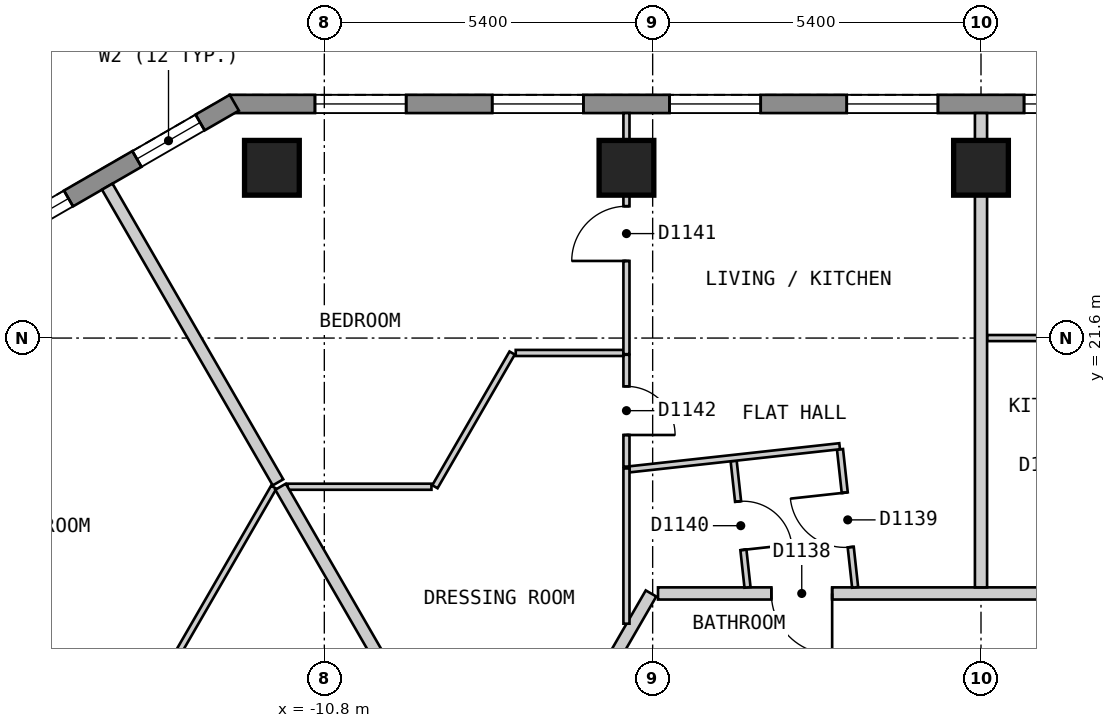
"""IFC4 building model, lengths in metres.
Left out: names, types, materials, properties, quantities, classifications, styles, units other than length and angle.
Written with IfcOpenShell. Run it as: python <this file> out.ifc"""

import sys

from ifc_helpers import new_model, si_unit, direction, frame, frame_2d, origin, origin_2d, place, context, subcontext, project, spatial, polyline, rectangle, outline, extrude, element, fill, save


model = new_model("IFC4")
c1 = context("Model", 3, precision=1e-05, world=origin(), true_north=direction((0.0, 1.0)))
c2 = subcontext(c1, "Body", "Model", "MODEL_VIEW")
j1 = project(units=[si_unit("LENGTHUNIT", "METRE"), si_unit("PLANEANGLEUNIT", "RADIAN")], contexts=[c1])
p1 = place(None, origin())
s1 = spatial("IfcSite", under=j1, at=p1, CompositionType="ELEMENT")
p2 = place(p1, origin())
s2 = spatial("IfcBuilding", under=s1, at=p2, CompositionType="ELEMENT")
p3 = place(p2, frame((0.0, 0.0, 144.6)))
s3 = spatial("IfcBuildingStorey", under=s2, at=p3, CompositionType="ELEMENT", Elevation=144.6)
for number, where, z_axis, x_axis in (
    (1, (0.0, 24.4, 0.0), (0.0, 0.0, 1.0), (-1.0, 0.0, 0.0)),
    (2, (-5.831, 24.4, 0.0), (0.0, 0.0, 1.0), (-1.0, 0.0, 0.0)),
    (3, (-11.662, 24.4, 0.0), (0.0, 0.0, 1.0), (-1.0, 0.0, 0.0)),
):
    element("IfcColumn", number, at=place(p3, frame(where, z_axis=z_axis, x_axis=x_axis)), inside=s3, PredefinedType="COLUMN", context=c2, shape_type="SweptSolid", body=[
        extrude(rectangle(XDim=0.9, YDim=0.9, at=origin_2d()), origin(), (0.0, 0.0, 1.0), 3.0),
    ])
p4 = place(p3, frame((12.355, 25.45, 0.0), z_axis=(0.0, 0.0, 1.0), x_axis=(-1.0, 0.0, 0.0)))
e4 = element("IfcWall", 4, at=p4, inside=s3, PredefinedType="SOLIDWALL", context=c2, shape_type="SweptSolid", body=[
    extrude(outline(polyline([(0.0, -0.15), (24.71, -0.15), (24.63, 0.15), (0.08, 0.15), (0.0, -0.15)])), origin(), (0.0, 0.0, 1.0), 2.7),
])
p5 = place(p4, frame((1.401, 0.0, 0.15)))
e5 = element("IfcOpeningElement", 5, at=p5, cuts=e4, PredefinedType="OPENING", context=c2, shape_type="SweptSolid", body=[
    extrude(rectangle(XDim=1.5, YDim=2.1, at=frame_2d((0.75, 1.05))), frame((0.0, 0.16, 0.0), z_axis=(0.0, -1.0, 0.0), x_axis=(1.0, 0.0, 0.0)), (0.0, 0.0, 1.0), 0.32),
])
p6 = place(p4, frame((4.316, 0.0, 0.15)))
e6 = element("IfcOpeningElement", 6, at=p6, cuts=e4, PredefinedType="OPENING", context=c2, shape_type="SweptSolid", body=[
    extrude(rectangle(XDim=1.5, YDim=2.1, at=frame_2d((0.75, 1.05))), frame((0.0, 0.16, 0.0), z_axis=(0.0, -1.0, 0.0), x_axis=(1.0, 0.0, 0.0)), (0.0, 0.0, 1.0), 0.32),
])
p7 = place(p4, frame((7.232, 0.0, 0.15)))
e7 = element("IfcOpeningElement", 7, at=p7, cuts=e4, PredefinedType="OPENING", context=c2, shape_type="SweptSolid", body=[
    extrude(rectangle(XDim=1.5, YDim=2.1, at=frame_2d((0.75, 1.05))), frame((0.0, 0.16, 0.0), z_axis=(0.0, -1.0, 0.0), x_axis=(1.0, 0.0, 0.0)), (0.0, 0.0, 1.0), 0.32),
])
p8 = place(p4, frame((10.147, 0.0, 0.15)))
e8 = element("IfcOpeningElement", 8, at=p8, cuts=e4, PredefinedType="OPENING", context=c2, shape_type="SweptSolid", body=[
    extrude(rectangle(XDim=1.5, YDim=2.1, at=frame_2d((0.75, 1.05))), frame((0.0, 0.16, 0.0), z_axis=(0.0, -1.0, 0.0), x_axis=(1.0, 0.0, 0.0)), (0.0, 0.0, 1.0), 0.32),
])
p9 = place(p4, frame((13.063, 0.0, 0.15)))
e9 = element("IfcOpeningElement", 9, at=p9, cuts=e4, PredefinedType="OPENING", context=c2, shape_type="SweptSolid", body=[
    extrude(rectangle(XDim=1.5, YDim=2.1, at=frame_2d((0.75, 1.05))), frame((0.0, 0.16, 0.0), z_axis=(0.0, -1.0, 0.0), x_axis=(1.0, 0.0, 0.0)), (0.0, 0.0, 1.0), 0.32),
])
p10 = place(p4, frame((15.978, 0.0, 0.15)))
e10 = element("IfcOpeningElement", 10, at=p10, cuts=e4, PredefinedType="OPENING", context=c2, shape_type="SweptSolid", body=[
    extrude(rectangle(XDim=1.5, YDim=2.1, at=frame_2d((0.75, 1.05))), frame((0.0, 0.16, 0.0), z_axis=(0.0, -1.0, 0.0), x_axis=(1.0, 0.0, 0.0)), (0.0, 0.0, 1.0), 0.32),
])
p11 = place(p4, frame((18.894, 0.0, 0.15)))
e11 = element("IfcOpeningElement", 11, at=p11, cuts=e4, PredefinedType="OPENING", context=c2, shape_type="SweptSolid", body=[
    extrude(rectangle(XDim=1.5, YDim=2.1, at=frame_2d((0.75, 1.05))), frame((0.0, 0.16, 0.0), z_axis=(0.0, -1.0, 0.0), x_axis=(1.0, 0.0, 0.0)), (0.0, 0.0, 1.0), 0.32),
])
p12 = place(p4, frame((21.809, 0.0, 0.15)))
e12 = element("IfcOpeningElement", 12, at=p12, cuts=e4, PredefinedType="OPENING", context=c2, shape_type="SweptSolid", body=[
    extrude(rectangle(XDim=1.5, YDim=2.1, at=frame_2d((0.75, 1.05))), frame((0.0, 0.16, 0.0), z_axis=(0.0, -1.0, 0.0), x_axis=(1.0, 0.0, 0.0)), (0.0, 0.0, 1.0), 0.32),
])
p13 = place(p3, frame((-12.28, 25.47, 0.0), z_axis=(0.0, 0.0, 1.0), x_axis=(-0.866022959057, -0.500004234368, 0.0)))
e13 = element("IfcWall", 13, at=p13, inside=s3, PredefinedType="SOLIDWALL", context=c2, shape_type="SweptSolid", body=[
    extrude(outline(polyline([(0.0, -0.15), (5.0, -0.15), (4.92, 0.15), (0.08, 0.15), (0.0, -0.15)])), origin(), (0.0, 0.0, 1.0), 2.7),
])
p14 = place(p13, frame((0.65, 0.0, 0.15)))
e14 = element("IfcOpeningElement", 14, at=p14, cuts=e13, PredefinedType="OPENING", context=c2, shape_type="SweptSolid", body=[
    extrude(rectangle(XDim=1.2, YDim=2.1, at=frame_2d((0.6, 1.05))), frame((0.0, 0.16, 0.0), z_axis=(0.0, -1.0, 0.0), x_axis=(1.0, 0.0, 0.0)), (0.0, 0.0, 1.0), 0.32),
])
p15 = place(p13, frame((3.149, 0.0, 0.15)))
e15 = element("IfcOpeningElement", 15, at=p15, cuts=e13, PredefinedType="OPENING", context=c2, shape_type="SweptSolid", body=[
    extrude(rectangle(XDim=1.2, YDim=2.1, at=frame_2d((0.6, 1.05))), frame((0.0, 0.16, 0.0), z_axis=(0.0, -1.0, 0.0), x_axis=(1.0, 0.0, 0.0)), (0.0, 0.0, 1.0), 0.32),
])
p16 = place(p3, frame((-5.312, 17.4, 0.0), z_axis=(0.0, 0.0, 1.0), x_axis=(1.0, 0.0, 0.0)))
e16 = element("IfcWall", 16, at=p16, inside=s3, PredefinedType="PARTITIONING", context=c2, shape_type="SweptSolid", body=[
    extrude(rectangle(XDim=10.739, YDim=0.2, at=frame_2d((5.37, 0.0))), origin(), (0.0, 0.0, 1.0), 2.7),
])
p17 = place(p16, frame((7.538, 0.0, 0.0)))
e17 = element("IfcOpeningElement", 17, at=p17, cuts=e16, PredefinedType="OPENING", context=c2, shape_type="SweptSolid", body=[
    extrude(rectangle(XDim=1.0, YDim=2.1, at=frame_2d((0.5, 1.05))), frame((0.0, 0.11, 0.0), z_axis=(0.0, -1.0, 0.0), x_axis=(1.0, 0.0, 0.0)), (0.0, 0.0, 1.0), 0.22),
])
p18 = place(p16, frame((1.864, 0.0, 0.0)))
e18 = element("IfcOpeningElement", 18, at=p18, cuts=e16, PredefinedType="OPENING", context=c2, shape_type="SweptSolid", body=[
    extrude(rectangle(XDim=1.0, YDim=2.1, at=frame_2d((0.5, 1.05))), frame((0.0, 0.11, 0.0), z_axis=(0.0, -1.0, 0.0), x_axis=(1.0, 0.0, 0.0)), (0.0, 0.0, 1.0), 0.22),
])
p19 = place(p3, frame((-6.697, 15.2, 0.0), z_axis=(0.0, 0.0, 1.0), x_axis=(0.499963722229, 0.866046347752, 0.0)))
e19 = element("IfcWall", 19, at=p19, inside=s3, PredefinedType="PARTITIONING", context=c2, shape_type="SweptSolid", body=[
    extrude(rectangle(XDim=2.54, YDim=0.2, at=frame_2d((1.27, 0.0))), origin(), (0.0, 0.0, 1.0), 2.7),
])
p20 = place(p3, frame((-2.319, 19.77, 0.0), z_axis=(0.0, 0.0, 1.0), x_axis=(0.109046821538, -0.994036614372, 0.0)))
e20 = element("IfcWall", 20, at=p20, inside=s3, PredefinedType="PARTITIONING", context=c2, shape_type="SweptSolid", body=[
    extrude(rectangle(XDim=2.284, YDim=0.1, at=frame_2d((1.142, 0.0))), origin(), (0.0, 0.0, 1.0), 2.7),
])
p21 = place(p20, frame((0.717, 0.0, 0.0)))
e21 = element("IfcOpeningElement", 21, at=p21, cuts=e20, PredefinedType="OPENING", context=c2, shape_type="SweptSolid", body=[
    extrude(rectangle(XDim=0.9, YDim=2.1, at=frame_2d((0.45, 1.05))), frame((0.0, 0.06, 0.0), z_axis=(0.0, -1.0, 0.0), x_axis=(1.0, 0.0, 0.0)), (0.0, 0.0, 1.0), 0.12),
])
p22 = place(p3, frame((-4.068, 19.579, 0.0), z_axis=(0.0, 0.0, 1.0), x_axis=(0.109022161139, -0.994039319333, 0.0)))
e22 = element("IfcWall", 22, at=p22, inside=s3, PredefinedType="PARTITIONING", context=c2, shape_type="SweptSolid", body=[
    extrude(rectangle(XDim=2.092, YDim=0.1, at=frame_2d((1.046, 0.0))), origin(), (0.0, 0.0, 1.0), 2.7),
])
p23 = place(p22, frame((0.671, 0.0, 0.0)))
e23 = element("IfcOpeningElement", 23, at=p23, cuts=e22, PredefinedType="OPENING", context=c2, shape_type="SweptSolid", body=[
    extrude(rectangle(XDim=0.8, YDim=2.1, at=frame_2d((0.4, 1.05))), frame((0.0, 0.06, 0.0), z_axis=(0.0, -1.0, 0.0), x_axis=(1.0, 0.0, 0.0)), (0.0, 0.0, 1.0), 0.12),
])
p24 = place(p3, frame((-5.831, 21.325, 0.0), z_axis=(0.0, 0.0, 1.0), x_axis=(0.0, -1.0, 0.0)))
e24 = element("IfcWall", 24, at=p24, inside=s3, PredefinedType="PARTITIONING", context=c2, shape_type="SweptSolid", body=[
    extrude(rectangle(XDim=1.839, YDim=0.1, at=frame_2d((0.919, 0.0))), origin(), (0.0, 0.0, 1.0), 2.7),
])
p25 = place(p24, frame((0.519, 0.0, 0.0)))
e25 = element("IfcOpeningElement", 25, at=p25, cuts=e24, PredefinedType="OPENING", context=c2, shape_type="SweptSolid", body=[
    extrude(rectangle(XDim=0.8, YDim=2.1, at=frame_2d((0.4, 1.05))), frame((0.0, 0.06, 0.0), z_axis=(0.0, -1.0, 0.0), x_axis=(1.0, 0.0, 0.0)), (0.0, 0.0, 1.0), 0.12),
])
p26 = place(p3, frame((-19.514, 17.599, 0.0), z_axis=(0.0, 0.0, 1.0), x_axis=(0.866007554612, -0.500030914399, 0.0)))
e26 = element("IfcWall", 26, at=p26, inside=s3, PredefinedType="PARTITIONING", context=c2, shape_type="SweptSolid", body=[
    extrude(rectangle(XDim=6.052, YDim=0.1, at=frame_2d((3.026, 0.0))), origin(), (0.0, 0.0, 1.0), 2.7),
])
p27 = place(p26, frame((2.576, 0.0, 0.0)))
e27 = element("IfcOpeningElement", 27, at=p27, cuts=e26, PredefinedType="OPENING", context=c2, shape_type="SweptSolid", body=[
    extrude(rectangle(XDim=0.9, YDim=2.1, at=frame_2d((0.45, 1.05))), frame((0.0, 0.06, 0.0), z_axis=(0.0, -1.0, 0.0), x_axis=(1.0, 0.0, 0.0)), (0.0, 0.0, 1.0), 0.12),
])
p28 = place(p3, frame((-11.405, 19.155, 0.0), z_axis=(0.0, 0.0, 1.0), x_axis=(1.0, 0.0, 0.0)))
e28 = element("IfcWall", 28, at=p28, inside=s3, PredefinedType="PARTITIONING", context=c2, shape_type="SweptSolid", body=[
    extrude(rectangle(XDim=2.367, YDim=0.1, at=frame_2d((1.184, 0.0))), origin(), (0.0, 0.0, 1.0), 2.7),
])
p29 = place(p3, frame((-7.652, 21.355, 0.0), z_axis=(0.0, 0.0, 1.0), x_axis=(1.0, 0.0, 0.0)))
e29 = element("IfcWall", 29, at=p29, inside=s3, PredefinedType="PARTITIONING", context=c2, shape_type="SweptSolid", body=[
    extrude(rectangle(XDim=1.771, YDim=0.1, at=frame_2d((0.885, 0.0))), origin(), (0.0, 0.0, 1.0), 2.7),
])
p30 = place(p3, frame((0.1, 21.6, 0.0), z_axis=(0.0, 0.0, 1.0), x_axis=(1.0, 0.0, 0.0)))
e30 = element("IfcWall", 30, at=p30, inside=s3, PredefinedType="PARTITIONING", context=c2, shape_type="SweptSolid", body=[
    extrude(rectangle(XDim=7.752, YDim=0.1, at=frame_2d((3.876, 0.0))), origin(), (0.0, 0.0, 1.0), 2.7),
])
p31 = place(p30, frame((2.634, 0.0, 0.0)))
e31 = element("IfcOpeningElement", 31, at=p31, cuts=e30, PredefinedType="OPENING", context=c2, shape_type="SweptSolid", body=[
    extrude(rectangle(XDim=0.9, YDim=2.1, at=frame_2d((0.45, 1.05))), frame((0.0, 0.06, 0.0), z_axis=(0.0, -1.0, 0.0), x_axis=(1.0, 0.0, 0.0)), (0.0, 0.0, 1.0), 0.12),
])
p32 = place(p3, frame((-8.981, 19.155, 0.0), z_axis=(0.0, 0.0, 1.0), x_axis=(0.500130227609, 0.865950203783, 0.0)))
e32 = element("IfcWall", 32, at=p32, inside=s3, PredefinedType="PARTITIONING", context=c2, shape_type="SweptSolid", body=[
    extrude(rectangle(XDim=2.539, YDim=0.1, at=frame_2d((1.27, 0.0))), origin(), (0.0, 0.0, 1.0), 2.7),
])
p33 = place(p3, frame((-22.398, 0.499, 0.0), z_axis=(0.0, 0.0, 1.0), x_axis=(0.499981561717, 0.866036048871, 0.0)))
e33 = element("IfcWall", 33, at=p33, inside=s3, PredefinedType="PARTITIONING", context=c2, shape_type="SweptSolid", body=[
    extrude(rectangle(XDim=21.532, YDim=0.1, at=frame_2d((10.766, 0.0))), origin(), (0.0, 0.0, 1.0), 2.7),
])
p34 = place(p33, frame((13.049, 0.0, 0.0)))
e34 = element("IfcOpeningElement", 34, at=p34, cuts=e33, PredefinedType="OPENING", context=c2, shape_type="SweptSolid", body=[
    extrude(rectangle(XDim=0.9, YDim=2.1, at=frame_2d((0.45, 1.05))), frame((0.0, 0.06, 0.0), z_axis=(0.0, -1.0, 0.0), x_axis=(1.0, 0.0, 0.0)), (0.0, 0.0, 1.0), 0.12),
])
p35 = place(p33, frame((2.183, 0.0, 0.0)))
e35 = element("IfcOpeningElement", 35, at=p35, cuts=e33, PredefinedType="OPENING", context=c2, shape_type="SweptSolid", body=[
    extrude(rectangle(XDim=0.8, YDim=2.1, at=frame_2d((0.4, 1.05))), frame((0.0, 0.06, 0.0), z_axis=(0.0, -1.0, 0.0), x_axis=(1.0, 0.0, 0.0)), (0.0, 0.0, 1.0), 0.12),
])
p36 = place(p3, frame((-5.781, 19.441, 0.0), z_axis=(0.0, 0.0, 1.0), x_axis=(0.994005576935, 0.109329378588, 0.0)))
e36 = element("IfcWall", 36, at=p36, inside=s3, PredefinedType="PARTITIONING", context=c2, shape_type="SweptSolid", body=[
    extrude(rectangle(XDim=3.477, YDim=0.1, at=frame_2d((1.738, 0.0))), origin(), (0.0, 0.0, 1.0), 2.7),
])
p37 = place(p3, frame((-5.831, 16.903, 0.0), z_axis=(0.0, 0.0, 1.0), x_axis=(0.0, 1.0, 0.0)))
e37 = element("IfcWall", 37, at=p37, inside=s3, PredefinedType="PARTITIONING", context=c2, shape_type="SweptSolid", body=[
    extrude(rectangle(XDim=2.553, YDim=0.1, at=frame_2d((1.276, 0.0))), origin(), (0.0, 0.0, 1.0), 2.7),
])
p38 = place(p3, frame((-5.831, 21.335, 0.0), z_axis=(0.0, 0.0, 1.0), x_axis=(0.0, 1.0, 0.0)))
e38 = element("IfcWall", 38, at=p38, inside=s3, PredefinedType="PARTITIONING", context=c2, shape_type="SweptSolid", body=[
    extrude(rectangle(XDim=3.965, YDim=0.1, at=frame_2d((1.982, 0.0))), origin(), (0.0, 0.0, 1.0), 2.7),
])
p39 = place(p38, frame((1.533, 0.0, 0.0)))
e39 = element("IfcOpeningElement", 39, at=p39, cuts=e38, PredefinedType="OPENING", context=c2, shape_type="SweptSolid", body=[
    extrude(rectangle(XDim=0.9, YDim=2.1, at=frame_2d((0.45, 1.05))), frame((0.0, 0.06, 0.0), z_axis=(0.0, -1.0, 0.0), x_axis=(1.0, 0.0, 0.0)), (0.0, 0.0, 1.0), 0.12),
])
p40 = place(p3, frame((-14.37, 24.09, 0.0), z_axis=(0.0, 0.0, 1.0), x_axis=(0.500057386422, -0.865992269183, 0.0)))
e40 = element("IfcWall", 40, at=p40, inside=s3, PredefinedType="PARTITIONING", context=c2, shape_type="SweptSolid", body=[
    extrude(rectangle(XDim=5.615, YDim=0.2, at=frame_2d((2.808, 0.0))), origin(), (0.0, 0.0, 1.0), 2.7),
])
p41 = place(p3, frame((-11.52, 19.155, 0.0), z_axis=(0.0, 0.0, 1.0), x_axis=(0.499916824138, -0.866073420066, 0.0)))
e41 = element("IfcWall", 41, at=p41, inside=s3, PredefinedType="PARTITIONING", context=c2, shape_type="SweptSolid", body=[
    extrude(rectangle(XDim=4.567, YDim=0.2, at=frame_2d((2.283, 0.0))), origin(), (0.0, 0.0, 1.0), 2.7),
])
p42 = place(p3, frame((0.0, 17.5, 0.0), z_axis=(0.0, 0.0, 1.0), x_axis=(0.0, 1.0, 0.0)))
e42 = element("IfcWall", 42, at=p42, inside=s3, PredefinedType="PARTITIONING", context=c2, shape_type="SweptSolid", body=[
    extrude(rectangle(XDim=7.8, YDim=0.2, at=frame_2d((3.9, 0.0))), origin(), (0.0, 0.0, 1.0), 2.7),
])
p43 = place(p8, origin())
e43 = element("IfcWindow", 43, at=p43, inside=s3, PartitioningType="SINGLE_PANEL", PredefinedType="WINDOW", context=c2, shape_type="SweptSolid", body=[
    extrude(rectangle(XDim=1.5, YDim=2.1, at=frame_2d((0.75, 1.05))), frame((0.0, 0.03, 0.0), z_axis=(0.0, -1.0, 0.0), x_axis=(1.0, 0.0, 0.0)), (0.0, 0.0, 1.0), 0.06),
])
fill(e8, e43)
p44 = place(p9, origin())
e44 = element("IfcWindow", 44, at=p44, inside=s3, PartitioningType="SINGLE_PANEL", PredefinedType="WINDOW", context=c2, shape_type="SweptSolid", body=[
    extrude(rectangle(XDim=1.5, YDim=2.1, at=frame_2d((0.75, 1.05))), frame((0.0, 0.03, 0.0), z_axis=(0.0, -1.0, 0.0), x_axis=(1.0, 0.0, 0.0)), (0.0, 0.0, 1.0), 0.06),
])
fill(e9, e44)
p45 = place(p10, origin())
e45 = element("IfcWindow", 45, at=p45, inside=s3, PartitioningType="SINGLE_PANEL", PredefinedType="WINDOW", context=c2, shape_type="SweptSolid", body=[
    extrude(rectangle(XDim=1.5, YDim=2.1, at=frame_2d((0.75, 1.05))), frame((0.0, 0.03, 0.0), z_axis=(0.0, -1.0, 0.0), x_axis=(1.0, 0.0, 0.0)), (0.0, 0.0, 1.0), 0.06),
])
fill(e10, e45)
p46 = place(p11, origin())
e46 = element("IfcWindow", 46, at=p46, inside=s3, PartitioningType="SINGLE_PANEL", PredefinedType="WINDOW", context=c2, shape_type="SweptSolid", body=[
    extrude(rectangle(XDim=1.5, YDim=2.1, at=frame_2d((0.75, 1.05))), frame((0.0, 0.03, 0.0), z_axis=(0.0, -1.0, 0.0), x_axis=(1.0, 0.0, 0.0)), (0.0, 0.0, 1.0), 0.06),
])
fill(e11, e46)
p47 = place(p12, origin())
e47 = element("IfcWindow", 47, at=p47, inside=s3, PartitioningType="SINGLE_PANEL", PredefinedType="WINDOW", context=c2, shape_type="SweptSolid", body=[
    extrude(rectangle(XDim=1.5, YDim=2.1, at=frame_2d((0.75, 1.05))), frame((0.0, 0.03, 0.0), z_axis=(0.0, -1.0, 0.0), x_axis=(1.0, 0.0, 0.0)), (0.0, 0.0, 1.0), 0.06),
])
fill(e12, e47)
p48 = place(p14, origin())
e48 = element("IfcWindow", 48, at=p48, inside=s3, PartitioningType="SINGLE_PANEL", PredefinedType="WINDOW", context=c2, shape_type="SweptSolid", body=[
    extrude(rectangle(XDim=1.2, YDim=2.1, at=frame_2d((0.6, 1.05))), frame((0.0, 0.03, 0.0), z_axis=(0.0, -1.0, 0.0), x_axis=(1.0, 0.0, 0.0)), (0.0, 0.0, 1.0), 0.06),
])
fill(e14, e48)
p49 = place(p15, origin())
e49 = element("IfcWindow", 49, at=p49, inside=s3, PartitioningType="SINGLE_PANEL", PredefinedType="WINDOW", context=c2, shape_type="SweptSolid", body=[
    extrude(rectangle(XDim=1.2, YDim=2.1, at=frame_2d((0.6, 1.05))), frame((0.0, 0.03, 0.0), z_axis=(0.0, -1.0, 0.0), x_axis=(1.0, 0.0, 0.0)), (0.0, 0.0, 1.0), 0.06),
])
fill(e15, e49)
p50 = place(p18, origin())
e50 = element("IfcDoor", 50, at=p50, inside=s3, OperationType="SINGLE_SWING_RIGHT", PredefinedType="DOOR", context=c2, shape_type="SweptSolid", body=[
    extrude(rectangle(XDim=1.0, YDim=2.1, at=frame_2d((0.5, 1.05))), frame((0.0, 0.025, 0.0), z_axis=(0.0, -1.0, 0.0), x_axis=(1.0, 0.0, 0.0)), (0.0, 0.0, 1.0), 0.05),
])
fill(e18, e50)
p51 = place(p21, origin())
e51 = element("IfcDoor", 51, at=p51, inside=s3, OperationType="SINGLE_SWING_LEFT", PredefinedType="DOOR", context=c2, shape_type="SweptSolid", body=[
    extrude(rectangle(XDim=0.9, YDim=2.1, at=frame_2d((0.45, 1.05))), frame((0.0, 0.025, 0.0), z_axis=(0.0, -1.0, 0.0), x_axis=(1.0, 0.0, 0.0)), (0.0, 0.0, 1.0), 0.05),
])
fill(e21, e51)
p52 = place(p23, origin())
e52 = element("IfcDoor", 52, at=p52, inside=s3, OperationType="SINGLE_SWING_RIGHT", PredefinedType="DOOR", context=c2, shape_type="SweptSolid", body=[
    extrude(rectangle(XDim=0.8, YDim=2.1, at=frame_2d((0.4, 1.05))), frame((0.0, 0.025, 0.0), z_axis=(0.0, -1.0, 0.0), x_axis=(1.0, 0.0, 0.0)), (0.0, 0.0, 1.0), 0.05),
])
fill(e23, e52)
p53 = place(p39, origin())
e53 = element("IfcDoor", 53, at=p53, inside=s3, OperationType="SINGLE_SWING_LEFT", PredefinedType="DOOR", context=c2, shape_type="SweptSolid", body=[
    extrude(rectangle(XDim=0.9, YDim=2.1, at=frame_2d((0.45, 1.05))), frame((0.0, 0.025, 0.0), z_axis=(0.0, -1.0, 0.0), x_axis=(1.0, 0.0, 0.0)), (0.0, 0.0, 1.0), 0.05),
])
fill(e39, e53)
p54 = place(p25, origin())
e54 = element("IfcDoor", 54, at=p54, inside=s3, OperationType="SINGLE_SWING_RIGHT", PredefinedType="DOOR", context=c2, shape_type="SweptSolid", body=[
    extrude(rectangle(XDim=0.8, YDim=2.1, at=frame_2d((0.4, 1.05))), frame((0.0, 0.025, 0.0), z_axis=(0.0, -1.0, 0.0), x_axis=(1.0, 0.0, 0.0)), (0.0, 0.0, 1.0), 0.05),
])
fill(e25, e54)
save(model, sys.argv[1])
